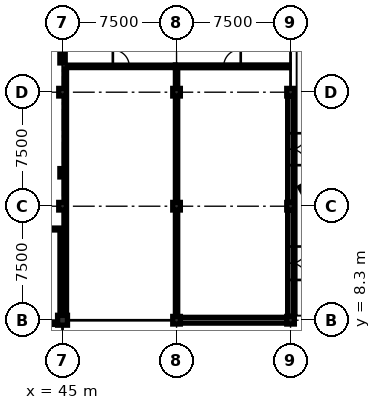
"""IFC4 building model, lengths in metres.
Left out: names, types, materials, properties, quantities, classifications, styles, units other than length and angle.
Written with IfcOpenShell. Run it as: python <this file> out.ifc"""

import sys

from ifc_helpers import new_model, si_unit, direction, frame, frame_2d, origin, origin_2d, place, context, subcontext, project, spatial, polyline, rectangle, outline, extrude, element, fill, save


model = new_model("IFC4")
c1 = context("Model", 3, precision=1e-05, world=origin(), true_north=direction((0.0, 1.0)))
c2 = subcontext(c1, "Body", "Model", "MODEL_VIEW")
j1 = project(units=[si_unit("LENGTHUNIT", "METRE"), si_unit("PLANEANGLEUNIT", "RADIAN")], contexts=[c1])
p1 = place(None, origin())
s1 = spatial("IfcSite", under=j1, at=p1, CompositionType="ELEMENT")
p2 = place(p1, origin())
s2 = spatial("IfcBuilding", under=s1, at=p2, CompositionType="ELEMENT")
p3 = place(p2, origin())
s3 = spatial("IfcBuildingStorey", under=s2, at=p3, CompositionType="ELEMENT", Elevation=0.0)
p4 = place(p3, frame((45.0, 8.3, 0.0), z_axis=(0.0, 0.0, 1.0), x_axis=(1.0, 0.0, 0.0)))
e1 = element("IfcColumn", 1, at=p4, inside=s3, PredefinedType="COLUMN", context=c2, shape_type="SweptSolid", body=[
    extrude(rectangle(XDim=0.65, YDim=0.65, at=origin_2d()), origin(), (0.0, 0.0, 1.0), 4.7),
])
for number, where, z_axis, x_axis in (
    (2, (45.0, 15.8, 0.0), (0.0, 0.0, 1.0), (1.0, 0.0, 0.0)),
    (3, (45.0, 23.3, 0.0), (0.0, 0.0, 1.0), (1.0, 0.0, 0.0)),
):
    element("IfcColumn", number, at=place(p3, frame(where, z_axis=z_axis, x_axis=x_axis)), inside=s3, PredefinedType="COLUMN", context=c2, shape_type="SweptSolid", body=[
        extrude(rectangle(XDim=0.5, YDim=0.5, at=origin_2d()), origin(), (0.0, 0.0, 1.0), 6.138),
    ])
for number, where, z_axis, x_axis in (
    (4, (52.5, 8.3, 0.0), (0.0, 0.0, 1.0), (1.0, 0.0, 0.0)),
    (5, (52.5, 15.8, 0.0), (0.0, 0.0, 1.0), (1.0, 0.0, 0.0)),
    (6, (52.5, 23.3, 0.0), (0.0, 0.0, 1.0), (1.0, 0.0, 0.0)),
):
    element("IfcColumn", number, at=place(p3, frame(where, z_axis=z_axis, x_axis=x_axis)), inside=s3, PredefinedType="COLUMN", context=c2, shape_type="SweptSolid", body=[
        extrude(rectangle(XDim=0.5, YDim=0.5, at=origin_2d()), origin(), (0.0, 0.0, 1.0), 5.036),
    ])
for number, where, z_axis, x_axis in (
    (7, (60.0, 8.3, 0.0), (0.0, 0.0, 1.0), (1.0, 0.0, 0.0)),
    (8, (60.0, 15.8, 0.0), (0.0, 0.0, 1.0), (1.0, 0.0, 0.0)),
    (9, (60.0, 23.3, 0.0), (0.0, 0.0, 1.0), (1.0, 0.0, 0.0)),
):
    element("IfcColumn", number, at=place(p3, frame(where, z_axis=z_axis, x_axis=x_axis)), inside=s3, PredefinedType="COLUMN", context=c2, shape_type="SweptSolid", body=[
        extrude(rectangle(XDim=0.5, YDim=0.5, at=origin_2d()), origin(), (0.0, 0.0, 1.0), 6.138),
    ])
for number, where, z_axis, x_axis in (
    (10, (45.0, 18.0, 0.0), (0.0, 0.0, 1.0), (1.0, 0.0, 0.0)),
    (11, (45.0, 25.5, 0.0), (0.0, 0.0, 1.0), (1.0, 0.0, 0.0)),
):
    element("IfcColumn", number, at=place(p3, frame(where, z_axis=z_axis, x_axis=x_axis)), inside=s3, PredefinedType="PILASTER", context=c2, shape_type="SweptSolid", body=[
        extrude(rectangle(XDim=0.35, YDim=0.55, at=origin_2d()), origin(), (0.0, 0.0, 1.0), 4.7),
    ])
p5 = place(p3, frame((62.004, 15.139, 0.0), z_axis=(0.0, 0.0, 1.0), x_axis=(-0.494337608543, 0.86926999763, 0.0)))
e12 = element("IfcWall", 12, at=p5, inside=s3, PredefinedType="SOLIDWALL", context=c2, shape_type="SweptSolid", body=[
    extrude(outline(polyline([(-0.275, 0.0), (0.275, 0.0), (0.845, 5.0), (0.294, 5.0), (-0.275, 0.0)])), frame((0.0, 0.0, 0.0), z_axis=(1.0, 0.0, 0.0), x_axis=(0.0, 1.0, 0.0)), (0.0, 0.0, 1.0), 2.351),
])
p6 = place(p5, origin())
e13 = element("IfcOpeningElement", 13, at=p6, cuts=e12, PredefinedType="OPENING", context=c2, shape_type="SweptSolid", body=[
    extrude(outline(polyline([(1.992, 2.5), (1.976, 2.889), (1.929, 3.264), (1.854, 3.609), (1.753, 3.911), (1.629, 4.159), (1.488, 4.344), (1.335, 4.457), (1.176, 4.496), (1.017, 4.457), (0.864, 4.344), (0.723, 4.159), (0.599, 3.911), (0.498, 3.609), (0.422, 3.264), (0.376, 2.889), (0.36, 2.5), (0.376, 2.111), (0.422, 1.736), (0.498, 1.391), (0.599, 1.089), (0.723, 0.841), (0.864, 0.656), (1.017, 0.543), (1.176, 0.504), (1.335, 0.543), (1.488, 0.656), (1.629, 0.841), (1.753, 1.089), (1.854, 1.391), (1.929, 1.736), (1.976, 2.111), (1.992, 2.5)])), frame((0.0, 0.865, 0.0), z_axis=(0.0, -1.0, 0.0), x_axis=(1.0, 0.0, 0.0)), (0.0, 0.0, 1.0), 1.16),
])
p7 = place(p3, frame((60.0, 23.05, 0.0), z_axis=(0.0, 0.0, 1.0), x_axis=(0.0, -1.0, 0.0)))
e14 = element("IfcWall", 14, at=p7, inside=s3, PredefinedType="SOLIDWALL", context=c2, shape_type="SweptSolid", body=[
    extrude(rectangle(XDim=7.0, YDim=0.38, at=frame_2d((3.5, 0.0))), origin(), (0.0, 0.0, 1.0), 4.7),
])
p8 = place(p7, frame((2.45, 0.0, 0.0)))
e15 = element("IfcOpeningElement", 15, at=p8, cuts=e14, PredefinedType="OPENING", context=c2, shape_type="SweptSolid", body=[
    extrude(rectangle(XDim=2.1, YDim=2.4, at=frame_2d((1.05, 1.2))), frame((0.0, 0.202, 0.0), z_axis=(0.0, -1.0, 0.0), x_axis=(1.0, 0.0, 0.0)), (0.0, 0.0, 1.0), 0.404),
])
p9 = place(p3, frame((60.0, 15.55, 0.0), z_axis=(0.0, 0.0, 1.0), x_axis=(0.0, -1.0, 0.0)))
e16 = element("IfcWall", 16, at=p9, inside=s3, PredefinedType="SOLIDWALL", context=c2, shape_type="SweptSolid", body=[
    extrude(rectangle(XDim=7.0, YDim=0.38, at=frame_2d((3.5, 0.0))), origin(), (0.0, 0.0, 1.0), 4.7),
])
p10 = place(p9, frame((2.4, 0.0, 0.0)))
e17 = element("IfcOpeningElement", 17, at=p10, cuts=e16, PredefinedType="OPENING", context=c2, shape_type="SweptSolid", body=[
    extrude(rectangle(XDim=2.2, YDim=2.45, at=frame_2d((1.1, 1.225))), frame((0.0, 0.202, 0.0), z_axis=(0.0, -1.0, 0.0), x_axis=(1.0, 0.0, 0.0)), (0.0, 0.0, 1.0), 0.404),
])
p11 = place(p3, frame((59.75, 8.3, 0.0), z_axis=(0.0, 0.0, 1.0), x_axis=(-1.0, 0.0, 0.0)))
e18 = element("IfcWall", 18, at=p11, inside=s3, PredefinedType="SOLIDWALL", context=c2, shape_type="SweptSolid", body=[
    extrude(rectangle(XDim=7.0, YDim=0.38, at=frame_2d((3.5, 0.0))), origin(), (0.0, 0.0, 1.0), 4.321),
])
p12 = place(p3, frame((30.387, 8.1, 0.0), z_axis=(0.0, 0.0, 1.0), x_axis=(1.0, 0.0, 0.0)))
e19 = element("IfcWall", 19, at=p12, inside=s3, PredefinedType="PARTITIONING", context=c2, shape_type="SweptSolid", body=[
    extrude(rectangle(XDim=14.281, YDim=0.15, at=frame_2d((7.141, 0.0))), origin(), (0.0, 0.0, 1.0), 3.985),
])
p13 = place(p12, frame((7.887, 0.0, 0.0)))
e20 = element("IfcOpeningElement", 20, at=p13, cuts=e19, PredefinedType="OPENING", context=c2, shape_type="SweptSolid", body=[
    extrude(rectangle(XDim=1.56, YDim=2.3, at=frame_2d((0.78, 1.15))), frame((0.0, 0.087, 0.0), z_axis=(0.0, -1.0, 0.0), x_axis=(1.0, 0.0, 0.0)), (0.0, 0.0, 1.0), 0.174),
])
p14 = place(p3, frame((45.285, 25.0, 0.0), z_axis=(0.0, 0.0, 1.0), x_axis=(1.0, 0.0, 0.0)))
e21 = element("IfcWall", 21, at=p14, inside=s3, PredefinedType="PARTITIONING", context=c2, shape_type="SweptSolid", body=[
    extrude(rectangle(XDim=7.13, YDim=0.16, at=frame_2d((3.565, 0.0))), origin(), (0.0, 0.0, 1.0), 4.321),
])
p15 = place(p14, frame((3.025, 0.0, 0.0)))
e22 = element("IfcOpeningElement", 22, at=p15, cuts=e21, PredefinedType="OPENING", context=c2, shape_type="SweptSolid", body=[
    extrude(rectangle(XDim=1.08, YDim=2.18, at=frame_2d((0.54, 1.09))), frame((0.0, 0.092, 0.0), z_axis=(0.0, -1.0, 0.0), x_axis=(1.0, 0.0, 0.0)), (0.0, 0.0, 1.0), 0.184),
])
p16 = place(p3, frame((52.427, 25.0, 0.0), z_axis=(0.0, 0.0, 1.0), x_axis=(1.0, 0.0, 0.0)))
e23 = element("IfcWall", 23, at=p16, inside=s3, PredefinedType="PARTITIONING", context=c2, shape_type="SweptSolid", body=[
    extrude(rectangle(XDim=7.471, YDim=0.18, at=frame_2d((3.735, 0.0))), origin(), (0.0, 0.0, 1.0), 4.321),
])
p17 = place(p16, frame((3.176, 0.0, 0.0)))
e24 = element("IfcOpeningElement", 24, at=p17, cuts=e23, PredefinedType="OPENING", context=c2, shape_type="SweptSolid", body=[
    extrude(rectangle(XDim=1.12, YDim=2.2, at=frame_2d((0.56, 1.1))), frame((0.0, 0.102, 0.0), z_axis=(0.0, -1.0, 0.0), x_axis=(1.0, 0.0, 0.0)), (0.0, 0.0, 1.0), 0.204),
])
p18 = place(p3, frame((30.087, 14.3, 0.0), z_axis=(0.0, 0.0, 1.0), x_axis=(1.0, 0.0, 0.0)))
e25 = element("IfcWall", 25, at=p18, inside=s3, PredefinedType="PARTITIONING", context=c2, shape_type="SweptSolid", body=[
    extrude(rectangle(XDim=14.748, YDim=0.125, at=frame_2d((7.374, 0.0))), origin(), (0.0, 0.0, 1.0), 3.985),
])
p19 = place(p3, frame((44.92, 8.432, 0.0), z_axis=(0.0, 0.0, 1.0), x_axis=(0.0, 1.0, 0.0)))
e26 = element("IfcWall", 26, at=p19, inside=s3, PredefinedType="PARTITIONING", context=c2, shape_type="SweptSolid", body=[
    extrude(rectangle(XDim=5.703, YDim=0.18, at=frame_2d((2.852, 0.0))), origin(), (0.0, 0.0, 1.0), 3.985),
])
p20 = place(p3, frame((45.2, 8.637, 0.0), z_axis=(0.0, 0.0, 1.0), x_axis=(0.0, 1.0, 0.0)))
e27 = element("IfcWall", 27, at=p20, inside=s3, PredefinedType="PARTITIONING", context=c2, shape_type="SweptSolid", body=[
    extrude(rectangle(XDim=16.198, YDim=0.125, at=frame_2d((8.099, 0.0))), origin(), (0.0, 0.0, 1.0), 3.985),
])
p21 = place(p3, frame((52.5, 8.562, 0.0), z_axis=(0.0, 0.0, 1.0), x_axis=(0.0, 1.0, 0.0)))
e28 = element("IfcWall", 28, at=p21, inside=s3, PredefinedType="PARTITIONING", context=c2, shape_type="SweptSolid", body=[
    extrude(rectangle(XDim=16.336, YDim=0.15, at=frame_2d((8.168, 0.0))), origin(), (0.0, 0.0, 1.0), 4.315),
])
p22 = place(p8, origin())
e29 = element("IfcDoor", 29, at=p22, inside=s3, OperationType="DOUBLE_DOOR_SINGLE_SWING", PredefinedType="DOOR", context=c2, shape_type="SweptSolid", body=[
    extrude(rectangle(XDim=2.1, YDim=2.4, at=frame_2d((1.05, 1.2))), frame((0.0, 0.025, 0.0), z_axis=(0.0, -1.0, 0.0), x_axis=(1.0, 0.0, 0.0)), (0.0, 0.0, 1.0), 0.05),
])
fill(e15, e29)
p23 = place(p10, origin())
e30 = element("IfcDoor", 30, at=p23, inside=s3, OperationType="DOUBLE_DOOR_SINGLE_SWING", PredefinedType="DOOR", context=c2, shape_type="SweptSolid", body=[
    extrude(rectangle(XDim=2.2, YDim=2.45, at=frame_2d((1.1, 1.225))), frame((0.0, 0.025, 0.0), z_axis=(0.0, -1.0, 0.0), x_axis=(1.0, 0.0, 0.0)), (0.0, 0.0, 1.0), 0.05),
])
fill(e17, e30)
p24 = place(p15, origin())
e31 = element("IfcDoor", 31, at=p24, inside=s3, OperationType="SINGLE_SWING_LEFT", PredefinedType="DOOR", context=c2, shape_type="SweptSolid", body=[
    extrude(rectangle(XDim=1.08, YDim=2.18, at=frame_2d((0.54, 1.09))), frame((0.0, 0.025, 0.0), z_axis=(0.0, -1.0, 0.0), x_axis=(1.0, 0.0, 0.0)), (0.0, 0.0, 1.0), 0.05),
])
fill(e22, e31)
p25 = place(p17, origin())
e32 = element("IfcDoor", 32, at=p25, inside=s3, OperationType="SINGLE_SWING_RIGHT", PredefinedType="DOOR", context=c2, shape_type="SweptSolid", body=[
    extrude(rectangle(XDim=1.12, YDim=2.2, at=frame_2d((0.56, 1.1))), frame((0.0, 0.025, 0.0), z_axis=(0.0, -1.0, 0.0), x_axis=(1.0, 0.0, 0.0)), (0.0, 0.0, 1.0), 0.05),
])
fill(e24, e32)
save(model, sys.argv[1])
